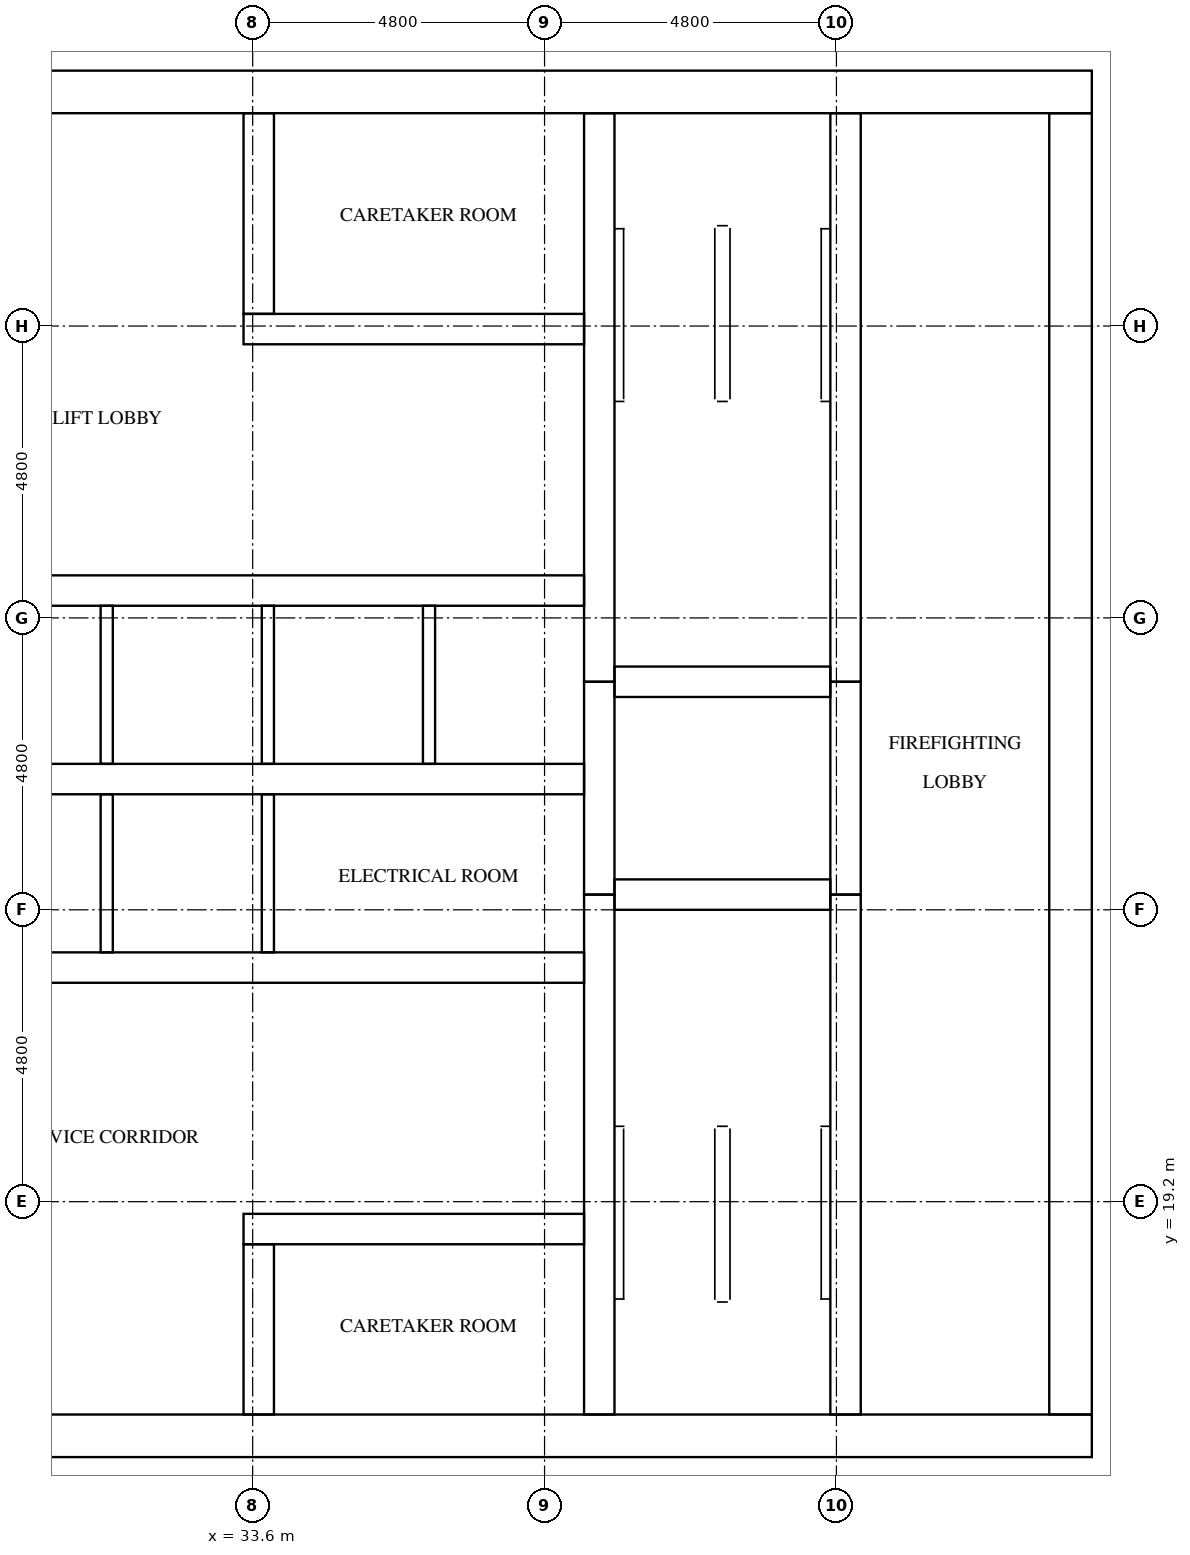
"""IFC4 building model, lengths in metres.
Left out: names, types, materials, properties, quantities, classifications, styles, units other than length and angle.
Written with IfcOpenShell. Run it as: python <this file> out.ifc"""

import sys

from ifc_helpers import new_model, si_unit, direction, frame, frame_2d, origin, place, context, subcontext, project, spatial, rectangle, extrude, element, fill, save


model = new_model("IFC4")
c1 = context("Model", 3, precision=1e-05, world=origin(), true_north=direction((0.0, 1.0)))
c2 = subcontext(c1, "Body", "Model", "MODEL_VIEW")
j1 = project(units=[si_unit("LENGTHUNIT", "METRE"), si_unit("PLANEANGLEUNIT", "RADIAN")], contexts=[c1])
p1 = place(None, origin())
s1 = spatial("IfcSite", under=j1, at=p1, CompositionType="ELEMENT")
p2 = place(p1, origin())
s2 = spatial("IfcBuilding", under=s1, at=p2, CompositionType="ELEMENT")
p3 = place(p2, frame((0.0, 0.0, 219.3)))
s3 = spatial("IfcBuildingStorey", under=s2, at=p3, CompositionType="ELEMENT", Elevation=219.3)
p4 = place(p3, frame((15.0, 15.35, 0.0), z_axis=(0.0, 0.0, 1.0), x_axis=(1.0, 0.0, 0.0)))
e1 = element("IfcWall", 1, at=p4, inside=s3, PredefinedType="SHEAR", context=c2, shape_type="SweptSolid", body=[
    extrude(rectangle(XDim=32.4, YDim=0.7, at=frame_2d((16.2, 0.0))), origin(), (0.0, 0.0, 1.0), 3.2),
])
p5 = place(p4, frame((15.3, 0.0, 0.0)))
e2 = element("IfcOpeningElement", 2, at=p5, cuts=e1, PredefinedType="OPENING", context=c2, shape_type="SweptSolid", body=[
    extrude(rectangle(XDim=1.8, YDim=2.1, at=frame_2d((0.9, 1.05))), frame((0.0, 0.36, 0.0), z_axis=(0.0, -1.0, 0.0), x_axis=(1.0, 0.0, 0.0)), (0.0, 0.0, 1.0), 0.72),
])
p6 = place(p3, frame((15.0, 37.45, 0.0), z_axis=(0.0, 0.0, 1.0), x_axis=(1.0, 0.0, 0.0)))
e3 = element("IfcWall", 3, at=p6, inside=s3, PredefinedType="SHEAR", context=c2, shape_type="SweptSolid", body=[
    extrude(rectangle(XDim=32.4, YDim=0.7, at=frame_2d((16.2, 0.0))), origin(), (0.0, 0.0, 1.0), 3.2),
])
p7 = place(p6, frame((15.3, 0.0, 0.0)))
e4 = element("IfcOpeningElement", 4, at=p7, cuts=e3, PredefinedType="OPENING", context=c2, shape_type="SweptSolid", body=[
    extrude(rectangle(XDim=1.8, YDim=2.1, at=frame_2d((0.9, 1.05))), frame((0.0, 0.36, 0.0), z_axis=(0.0, -1.0, 0.0), x_axis=(1.0, 0.0, 0.0)), (0.0, 0.0, 1.0), 0.72),
])
p8 = place(p6, frame((1.544, 0.0, 0.0)))
e5 = element("IfcOpeningElement", 5, at=p8, cuts=e3, PredefinedType="OPENING", context=c2, shape_type="SweptSolid", body=[
    extrude(rectangle(XDim=1.0, YDim=2.1, at=frame_2d((0.5, 1.05))), frame((0.0, 0.36, 0.0), z_axis=(0.0, -1.0, 0.0), x_axis=(1.0, 0.0, 0.0)), (0.0, 0.0, 1.0), 0.72),
])
p9 = place(p6, frame((5.219, 0.0, 0.0)))
e6 = element("IfcOpeningElement", 6, at=p9, cuts=e3, PredefinedType="OPENING", context=c2, shape_type="SweptSolid", body=[
    extrude(rectangle(XDim=1.0, YDim=2.1, at=frame_2d((0.5, 1.05))), frame((0.0, 0.36, 0.0), z_axis=(0.0, -1.0, 0.0), x_axis=(1.0, 0.0, 0.0)), (0.0, 0.0, 1.0), 0.72),
])
p10 = place(p3, frame((47.05, 15.7, 0.0), z_axis=(0.0, 0.0, 1.0), x_axis=(0.0, 1.0, 0.0)))
e7 = element("IfcWall", 7, at=p10, inside=s3, PredefinedType="SHEAR", context=c2, shape_type="SweptSolid", body=[
    extrude(rectangle(XDim=21.4, YDim=0.7, at=frame_2d((10.7, 0.0))), origin(), (0.0, 0.0, 1.0), 3.2),
])
p11 = place(p10, frame((10.4, 0.0, 0.0)))
e8 = element("IfcOpeningElement", 8, at=p11, cuts=e7, PredefinedType="OPENING", context=c2, shape_type="SweptSolid", body=[
    extrude(rectangle(XDim=1.2, YDim=2.1, at=frame_2d((0.6, 1.05))), frame((0.0, 0.36, 0.0), z_axis=(0.0, -1.0, 0.0), x_axis=(1.0, 0.0, 0.0)), (0.0, 0.0, 1.0), 0.72),
])
p12 = place(p3, frame((39.3, 15.7, 0.0), z_axis=(0.0, 0.0, 1.0), x_axis=(0.0, 1.0, 0.0)))
e9 = element("IfcWall", 9, at=p12, inside=s3, PredefinedType="SHEAR", context=c2, shape_type="SweptSolid", body=[
    extrude(rectangle(XDim=8.55, YDim=0.5, at=frame_2d((4.275, 0.0))), origin(), (0.0, 0.0, 1.0), 3.2),
])
p13 = place(p3, frame((39.3, 24.25, 0.0), z_axis=(0.0, 0.0, 1.0), x_axis=(0.0, 1.0, 0.0)))
e10 = element("IfcWall", 10, at=p13, inside=s3, PredefinedType="SHEAR", context=c2, shape_type="SweptSolid", body=[
    extrude(rectangle(XDim=3.5, YDim=0.5, at=frame_2d((1.75, 0.0))), origin(), (0.0, 0.0, 1.0), 3.2),
])
p14 = place(p3, frame((39.3, 27.75, 0.0), z_axis=(0.0, 0.0, 1.0), x_axis=(0.0, 1.0, 0.0)))
e11 = element("IfcWall", 11, at=p14, inside=s3, PredefinedType="SHEAR", context=c2, shape_type="SweptSolid", body=[
    extrude(rectangle(XDim=9.35, YDim=0.5, at=frame_2d((4.675, 0.0))), origin(), (0.0, 0.0, 1.0), 3.2),
])
p15 = place(p3, frame((43.35, 15.7, 0.0), z_axis=(0.0, 0.0, 1.0), x_axis=(0.0, 1.0, 0.0)))
e12 = element("IfcWall", 12, at=p15, inside=s3, PredefinedType="SHEAR", context=c2, shape_type="SweptSolid", body=[
    extrude(rectangle(XDim=8.55, YDim=0.5, at=frame_2d((4.275, 0.0))), origin(), (0.0, 0.0, 1.0), 3.2),
])
p16 = place(p15, frame((0.5, 0.0, 0.0)))
e13 = element("IfcOpeningElement", 13, at=p16, cuts=e12, PredefinedType="OPENING", context=c2, shape_type="SweptSolid", body=[
    extrude(rectangle(XDim=1.2, YDim=2.1, at=frame_2d((0.6, 1.05))), frame((0.0, 0.26, 0.0), z_axis=(0.0, -1.0, 0.0), x_axis=(1.0, 0.0, 0.0)), (0.0, 0.0, 1.0), 0.52),
])
p17 = place(p3, frame((43.35, 24.25, 0.0), z_axis=(0.0, 0.0, 1.0), x_axis=(0.0, 1.0, 0.0)))
e14 = element("IfcWall", 14, at=p17, inside=s3, PredefinedType="SHEAR", context=c2, shape_type="SweptSolid", body=[
    extrude(rectangle(XDim=3.5, YDim=0.5, at=frame_2d((1.75, 0.0))), origin(), (0.0, 0.0, 1.0), 3.2),
])
p18 = place(p17, frame((1.2, 0.0, 0.0)))
e15 = element("IfcOpeningElement", 15, at=p18, cuts=e14, PredefinedType="OPENING", context=c2, shape_type="SweptSolid", body=[
    extrude(rectangle(XDim=1.1, YDim=2.1, at=frame_2d((0.55, 1.05))), frame((0.0, 0.26, 0.0), z_axis=(0.0, -1.0, 0.0), x_axis=(1.0, 0.0, 0.0)), (0.0, 0.0, 1.0), 0.52),
])
p19 = place(p3, frame((43.35, 27.75, 0.0), z_axis=(0.0, 0.0, 1.0), x_axis=(0.0, 1.0, 0.0)))
e16 = element("IfcWall", 16, at=p19, inside=s3, PredefinedType="SHEAR", context=c2, shape_type="SweptSolid", body=[
    extrude(rectangle(XDim=9.35, YDim=0.5, at=frame_2d((4.675, 0.0))), origin(), (0.0, 0.0, 1.0), 3.2),
])
p20 = place(p19, frame((7.65, 0.0, 0.0)))
e17 = element("IfcOpeningElement", 17, at=p20, cuts=e16, PredefinedType="OPENING", context=c2, shape_type="SweptSolid", body=[
    extrude(rectangle(XDim=1.2, YDim=2.1, at=frame_2d((0.6, 1.05))), frame((0.0, 0.26, 0.0), z_axis=(0.0, -1.0, 0.0), x_axis=(1.0, 0.0, 0.0)), (0.0, 0.0, 1.0), 0.52),
])
for number, where, z_axis, x_axis in (
    (18, (39.55, 24.25, 0.0), (0.0, 0.0, 1.0), (1.0, 0.0, 0.0)),
    (19, (39.55, 27.75, 0.0), (0.0, 0.0, 1.0), (1.0, 0.0, 0.0)),
):
    element("IfcWall", number, at=place(p3, frame(where, z_axis=z_axis, x_axis=x_axis)), inside=s3, PredefinedType="SHEAR", context=c2, shape_type="SweptSolid", body=[
        extrude(rectangle(XDim=3.55, YDim=0.5, at=frame_2d((1.775, 0.0))), origin(), (0.0, 0.0, 1.0), 3.2),
    ])
p21 = place(p3, frame((33.45, 18.75, 0.0), z_axis=(0.0, 0.0, 1.0), x_axis=(1.0, 0.0, 0.0)))
e20 = element("IfcWall", 20, at=p21, inside=s3, PredefinedType="SHEAR", context=c2, shape_type="SweptSolid", body=[
    extrude(rectangle(XDim=5.6, YDim=0.5, at=frame_2d((2.8, 0.0))), origin(), (0.0, 0.0, 1.0), 3.2),
])
p22 = place(p21, frame((2.55, 0.0, 0.0)))
e21 = element("IfcOpeningElement", 21, at=p22, cuts=e20, PredefinedType="OPENING", context=c2, shape_type="SweptSolid", body=[
    extrude(rectangle(XDim=1.0, YDim=2.1, at=frame_2d((0.5, 1.05))), frame((0.0, 0.26, 0.0), z_axis=(0.0, -1.0, 0.0), x_axis=(1.0, 0.0, 0.0)), (0.0, 0.0, 1.0), 0.52),
])
p23 = place(p3, frame((23.35, 23.05, 0.0), z_axis=(0.0, 0.0, 1.0), x_axis=(1.0, 0.0, 0.0)))
e22 = element("IfcWall", 22, at=p23, inside=s3, PredefinedType="SHEAR", context=c2, shape_type="SweptSolid", body=[
    extrude(rectangle(XDim=15.7, YDim=0.5, at=frame_2d((7.85, 0.0))), origin(), (0.0, 0.0, 1.0), 3.2),
])
p24 = place(p23, frame((2.05, 0.0, 0.0)))
e23 = element("IfcOpeningElement", 23, at=p24, cuts=e22, PredefinedType="OPENING", context=c2, shape_type="SweptSolid", body=[
    extrude(rectangle(XDim=1.0, YDim=2.1, at=frame_2d((0.5, 1.05))), frame((0.0, 0.26, 0.0), z_axis=(0.0, -1.0, 0.0), x_axis=(1.0, 0.0, 0.0)), (0.0, 0.0, 1.0), 0.52),
])
p25 = place(p23, frame((12.65, 0.0, 0.0)))
e24 = element("IfcOpeningElement", 24, at=p25, cuts=e22, PredefinedType="OPENING", context=c2, shape_type="SweptSolid", body=[
    extrude(rectangle(XDim=1.0, YDim=2.1, at=frame_2d((0.5, 1.05))), frame((0.0, 0.26, 0.0), z_axis=(0.0, -1.0, 0.0), x_axis=(1.0, 0.0, 0.0)), (0.0, 0.0, 1.0), 0.52),
])
p26 = place(p3, frame((23.35, 26.15, 0.0), z_axis=(0.0, 0.0, 1.0), x_axis=(1.0, 0.0, 0.0)))
e25 = element("IfcWall", 25, at=p26, inside=s3, PredefinedType="SHEAR", context=c2, shape_type="SweptSolid", body=[
    extrude(rectangle(XDim=15.7, YDim=0.5, at=frame_2d((7.85, 0.0))), origin(), (0.0, 0.0, 1.0), 3.2),
])
p27 = place(p3, frame((23.35, 29.25, 0.0), z_axis=(0.0, 0.0, 1.0), x_axis=(1.0, 0.0, 0.0)))
e26 = element("IfcWall", 26, at=p27, inside=s3, PredefinedType="SHEAR", context=c2, shape_type="SweptSolid", body=[
    extrude(rectangle(XDim=15.7, YDim=0.5, at=frame_2d((7.85, 0.0))), origin(), (0.0, 0.0, 1.0), 3.2),
])
p28 = place(p27, frame((0.675, 0.0, 0.0)))
e27 = element("IfcOpeningElement", 27, at=p28, cuts=e26, PredefinedType="OPENING", context=c2, shape_type="SweptSolid", body=[
    extrude(rectangle(XDim=1.1, YDim=2.1, at=frame_2d((0.55, 1.05))), frame((0.0, 0.26, 0.0), z_axis=(0.0, -1.0, 0.0), x_axis=(1.0, 0.0, 0.0)), (0.0, 0.0, 1.0), 0.52),
])
p29 = place(p27, frame((3.325, 0.0, 0.0)))
e28 = element("IfcOpeningElement", 28, at=p29, cuts=e26, PredefinedType="OPENING", context=c2, shape_type="SweptSolid", body=[
    extrude(rectangle(XDim=1.1, YDim=2.1, at=frame_2d((0.55, 1.05))), frame((0.0, 0.26, 0.0), z_axis=(0.0, -1.0, 0.0), x_axis=(1.0, 0.0, 0.0)), (0.0, 0.0, 1.0), 0.52),
])
p30 = place(p27, frame((5.975, 0.0, 0.0)))
e29 = element("IfcOpeningElement", 29, at=p30, cuts=e26, PredefinedType="OPENING", context=c2, shape_type="SweptSolid", body=[
    extrude(rectangle(XDim=1.1, YDim=2.1, at=frame_2d((0.55, 1.05))), frame((0.0, 0.26, 0.0), z_axis=(0.0, -1.0, 0.0), x_axis=(1.0, 0.0, 0.0)), (0.0, 0.0, 1.0), 0.52),
])
p31 = place(p27, frame((8.625, 0.0, 0.0)))
e30 = element("IfcOpeningElement", 30, at=p31, cuts=e26, PredefinedType="OPENING", context=c2, shape_type="SweptSolid", body=[
    extrude(rectangle(XDim=1.1, YDim=2.1, at=frame_2d((0.55, 1.05))), frame((0.0, 0.26, 0.0), z_axis=(0.0, -1.0, 0.0), x_axis=(1.0, 0.0, 0.0)), (0.0, 0.0, 1.0), 0.52),
])
p32 = place(p27, frame((11.275, 0.0, 0.0)))
e31 = element("IfcOpeningElement", 31, at=p32, cuts=e26, PredefinedType="OPENING", context=c2, shape_type="SweptSolid", body=[
    extrude(rectangle(XDim=1.1, YDim=2.1, at=frame_2d((0.55, 1.05))), frame((0.0, 0.26, 0.0), z_axis=(0.0, -1.0, 0.0), x_axis=(1.0, 0.0, 0.0)), (0.0, 0.0, 1.0), 0.52),
])
p33 = place(p27, frame((13.925, 0.0, 0.0)))
e32 = element("IfcOpeningElement", 32, at=p33, cuts=e26, PredefinedType="OPENING", context=c2, shape_type="SweptSolid", body=[
    extrude(rectangle(XDim=1.1, YDim=2.1, at=frame_2d((0.55, 1.05))), frame((0.0, 0.26, 0.0), z_axis=(0.0, -1.0, 0.0), x_axis=(1.0, 0.0, 0.0)), (0.0, 0.0, 1.0), 0.52),
])
p34 = place(p3, frame((33.45, 33.55, 0.0), z_axis=(0.0, 0.0, 1.0), x_axis=(1.0, 0.0, 0.0)))
e33 = element("IfcWall", 33, at=p34, inside=s3, PredefinedType="SHEAR", context=c2, shape_type="SweptSolid", body=[
    extrude(rectangle(XDim=5.6, YDim=0.5, at=frame_2d((2.8, 0.0))), origin(), (0.0, 0.0, 1.0), 3.2),
])
p35 = place(p34, frame((2.55, 0.0, 0.0)))
e34 = element("IfcOpeningElement", 34, at=p35, cuts=e33, PredefinedType="OPENING", context=c2, shape_type="SweptSolid", body=[
    extrude(rectangle(XDim=1.0, YDim=2.1, at=frame_2d((0.5, 1.05))), frame((0.0, 0.26, 0.0), z_axis=(0.0, -1.0, 0.0), x_axis=(1.0, 0.0, 0.0)), (0.0, 0.0, 1.0), 0.52),
])
p36 = place(p3, frame((33.7, 15.7, 0.0), z_axis=(0.0, 0.0, 1.0), x_axis=(0.0, 1.0, 0.0)))
e35 = element("IfcWall", 35, at=p36, inside=s3, PredefinedType="SHEAR", context=c2, shape_type="SweptSolid", body=[
    extrude(rectangle(XDim=2.8, YDim=0.5, at=frame_2d((1.4, 0.0))), origin(), (0.0, 0.0, 1.0), 3.2),
])
p37 = place(p3, frame((33.7, 33.8, 0.0), z_axis=(0.0, 0.0, 1.0), x_axis=(0.0, 1.0, 0.0)))
e36 = element("IfcWall", 36, at=p37, inside=s3, PredefinedType="SHEAR", context=c2, shape_type="SweptSolid", body=[
    extrude(rectangle(XDim=3.3, YDim=0.5, at=frame_2d((1.65, 0.0))), origin(), (0.0, 0.0, 1.0), 3.2),
])
p38 = place(p3, frame((31.2, 23.3, 0.0), z_axis=(0.0, 0.0, 1.0), x_axis=(0.0, 1.0, 0.0)))
e37 = element("IfcWall", 37, at=p38, inside=s3, PredefinedType="SOLIDWALL", context=c2, shape_type="SweptSolid", body=[
    extrude(rectangle(XDim=2.6, YDim=0.2, at=frame_2d((1.3, 0.0))), origin(), (0.0, 0.0, 1.0), 3.2),
])
p39 = place(p3, frame((31.2, 26.4, 0.0), z_axis=(0.0, 0.0, 1.0), x_axis=(0.0, 1.0, 0.0)))
e38 = element("IfcWall", 38, at=p39, inside=s3, PredefinedType="SOLIDWALL", context=c2, shape_type="SweptSolid", body=[
    extrude(rectangle(XDim=2.6, YDim=0.2, at=frame_2d((1.3, 0.0))), origin(), (0.0, 0.0, 1.0), 3.2),
])
p40 = place(p3, frame((33.85, 23.3, 0.0), z_axis=(0.0, 0.0, 1.0), x_axis=(0.0, 1.0, 0.0)))
e39 = element("IfcWall", 39, at=p40, inside=s3, PredefinedType="SOLIDWALL", context=c2, shape_type="SweptSolid", body=[
    extrude(rectangle(XDim=2.6, YDim=0.2, at=frame_2d((1.3, 0.0))), origin(), (0.0, 0.0, 1.0), 3.2),
])
for number, where, z_axis, x_axis in (
    (40, (33.85, 26.4, 0.0), (0.0, 0.0, 1.0), (0.0, 1.0, 0.0)),
    (41, (36.5, 26.4, 0.0), (0.0, 0.0, 1.0), (0.0, 1.0, 0.0)),
):
    element("IfcWall", number, at=place(p3, frame(where, z_axis=z_axis, x_axis=x_axis)), inside=s3, PredefinedType="SOLIDWALL", context=c2, shape_type="SweptSolid", body=[
        extrude(rectangle(XDim=2.6, YDim=0.2, at=frame_2d((1.3, 0.0))), origin(), (0.0, 0.0, 1.0), 3.2),
    ])
p41 = place(p30, origin())
e42 = element("IfcDoor", 42, at=p41, inside=s3, OperationType="DOUBLE_DOOR_SLIDING", PredefinedType="DOOR", context=c2, shape_type="SweptSolid", body=[
    extrude(rectangle(XDim=1.1, YDim=2.1, at=frame_2d((0.55, 1.05))), frame((0.0, 0.025, 0.0), z_axis=(0.0, -1.0, 0.0), x_axis=(1.0, 0.0, 0.0)), (0.0, 0.0, 1.0), 0.05),
])
fill(e29, e42)
p42 = place(p31, origin())
e43 = element("IfcDoor", 43, at=p42, inside=s3, OperationType="DOUBLE_DOOR_SLIDING", PredefinedType="DOOR", context=c2, shape_type="SweptSolid", body=[
    extrude(rectangle(XDim=1.1, YDim=2.1, at=frame_2d((0.55, 1.05))), frame((0.0, 0.025, 0.0), z_axis=(0.0, -1.0, 0.0), x_axis=(1.0, 0.0, 0.0)), (0.0, 0.0, 1.0), 0.05),
])
fill(e30, e43)
p43 = place(p32, origin())
e44 = element("IfcDoor", 44, at=p43, inside=s3, OperationType="DOUBLE_DOOR_SLIDING", PredefinedType="DOOR", context=c2, shape_type="SweptSolid", body=[
    extrude(rectangle(XDim=1.1, YDim=2.1, at=frame_2d((0.55, 1.05))), frame((0.0, 0.025, 0.0), z_axis=(0.0, -1.0, 0.0), x_axis=(1.0, 0.0, 0.0)), (0.0, 0.0, 1.0), 0.05),
])
fill(e31, e44)
p44 = place(p33, origin())
e45 = element("IfcDoor", 45, at=p44, inside=s3, OperationType="DOUBLE_DOOR_SLIDING", PredefinedType="DOOR", context=c2, shape_type="SweptSolid", body=[
    extrude(rectangle(XDim=1.1, YDim=2.1, at=frame_2d((0.55, 1.05))), frame((0.0, 0.025, 0.0), z_axis=(0.0, -1.0, 0.0), x_axis=(1.0, 0.0, 0.0)), (0.0, 0.0, 1.0), 0.05),
])
fill(e32, e45)
p45 = place(p18, origin())
e46 = element("IfcDoor", 46, at=p45, inside=s3, OperationType="DOUBLE_DOOR_SLIDING", PredefinedType="DOOR", context=c2, shape_type="SweptSolid", body=[
    extrude(rectangle(XDim=1.1, YDim=2.1, at=frame_2d((0.55, 1.05))), frame((0.0, 0.025, 0.0), z_axis=(0.0, -1.0, 0.0), x_axis=(1.0, 0.0, 0.0)), (0.0, 0.0, 1.0), 0.05),
])
fill(e15, e46)
p46 = place(p16, origin())
e47 = element("IfcDoor", 47, at=p46, inside=s3, OperationType="SINGLE_SWING_RIGHT", PredefinedType="DOOR", context=c2, shape_type="SweptSolid", body=[
    extrude(rectangle(XDim=1.2, YDim=2.1, at=frame_2d((0.6, 1.05))), frame((0.0, 0.025, 0.0), z_axis=(0.0, -1.0, 0.0), x_axis=(1.0, 0.0, 0.0)), (0.0, 0.0, 1.0), 0.05),
])
fill(e13, e47)
p47 = place(p20, origin())
e48 = element("IfcDoor", 48, at=p47, inside=s3, OperationType="SINGLE_SWING_LEFT", PredefinedType="DOOR", context=c2, shape_type="SweptSolid", body=[
    extrude(rectangle(XDim=1.2, YDim=2.1, at=frame_2d((0.6, 1.05))), frame((0.0, 0.025, 0.0), z_axis=(0.0, -1.0, 0.0), x_axis=(1.0, 0.0, 0.0)), (0.0, 0.0, 1.0), 0.05),
])
fill(e17, e48)
p48 = place(p5, frame((1.8, 0.0, 0.0), z_axis=(0.0, 0.0, 1.0), x_axis=(-1.0, 0.0, 0.0)))
e49 = element("IfcDoor", 49, at=p48, inside=s3, OperationType="DOUBLE_DOOR_SINGLE_SWING", PredefinedType="DOOR", context=c2, shape_type="SweptSolid", body=[
    extrude(rectangle(XDim=1.8, YDim=2.1, at=frame_2d((0.9, 1.05))), frame((0.0, 0.025, 0.0), z_axis=(0.0, -1.0, 0.0), x_axis=(1.0, 0.0, 0.0)), (0.0, 0.0, 1.0), 0.05),
])
fill(e2, e49)
p49 = place(p7, origin())
e50 = element("IfcDoor", 50, at=p49, inside=s3, OperationType="DOUBLE_DOOR_SINGLE_SWING", PredefinedType="DOOR", context=c2, shape_type="SweptSolid", body=[
    extrude(rectangle(XDim=1.8, YDim=2.1, at=frame_2d((0.9, 1.05))), frame((0.0, 0.025, 0.0), z_axis=(0.0, -1.0, 0.0), x_axis=(1.0, 0.0, 0.0)), (0.0, 0.0, 1.0), 0.05),
])
fill(e4, e50)
p50 = place(p11, origin())
e51 = element("IfcDoor", 51, at=p50, inside=s3, OperationType="SINGLE_SWING_LEFT", PredefinedType="DOOR", context=c2, shape_type="SweptSolid", body=[
    extrude(rectangle(XDim=1.2, YDim=2.1, at=frame_2d((0.6, 1.05))), frame((0.0, 0.025, 0.0), z_axis=(0.0, -1.0, 0.0), x_axis=(1.0, 0.0, 0.0)), (0.0, 0.0, 1.0), 0.05),
])
fill(e8, e51)
p51 = place(p25, frame((1.0, 0.0, 0.0), z_axis=(0.0, 0.0, 1.0), x_axis=(-1.0, 0.0, 0.0)))
e52 = element("IfcDoor", 52, at=p51, inside=s3, OperationType="SINGLE_SWING_LEFT", PredefinedType="DOOR", context=c2, shape_type="SweptSolid", body=[
    extrude(rectangle(XDim=1.0, YDim=2.1, at=frame_2d((0.5, 1.05))), frame((0.0, 0.025, 0.0), z_axis=(0.0, -1.0, 0.0), x_axis=(1.0, 0.0, 0.0)), (0.0, 0.0, 1.0), 0.05),
])
fill(e24, e52)
p52 = place(p22, origin())
e53 = element("IfcDoor", 53, at=p52, inside=s3, OperationType="SINGLE_SWING_LEFT", PredefinedType="DOOR", context=c2, shape_type="SweptSolid", body=[
    extrude(rectangle(XDim=1.0, YDim=2.1, at=frame_2d((0.5, 1.05))), frame((0.0, 0.025, 0.0), z_axis=(0.0, -1.0, 0.0), x_axis=(1.0, 0.0, 0.0)), (0.0, 0.0, 1.0), 0.05),
])
fill(e21, e53)
p53 = place(p35, frame((1.0, 0.0, 0.0), z_axis=(0.0, 0.0, 1.0), x_axis=(-1.0, 0.0, 0.0)))
e54 = element("IfcDoor", 54, at=p53, inside=s3, OperationType="SINGLE_SWING_LEFT", PredefinedType="DOOR", context=c2, shape_type="SweptSolid", body=[
    extrude(rectangle(XDim=1.0, YDim=2.1, at=frame_2d((0.5, 1.05))), frame((0.0, 0.025, 0.0), z_axis=(0.0, -1.0, 0.0), x_axis=(1.0, 0.0, 0.0)), (0.0, 0.0, 1.0), 0.05),
])
fill(e34, e54)
save(model, sys.argv[1])
